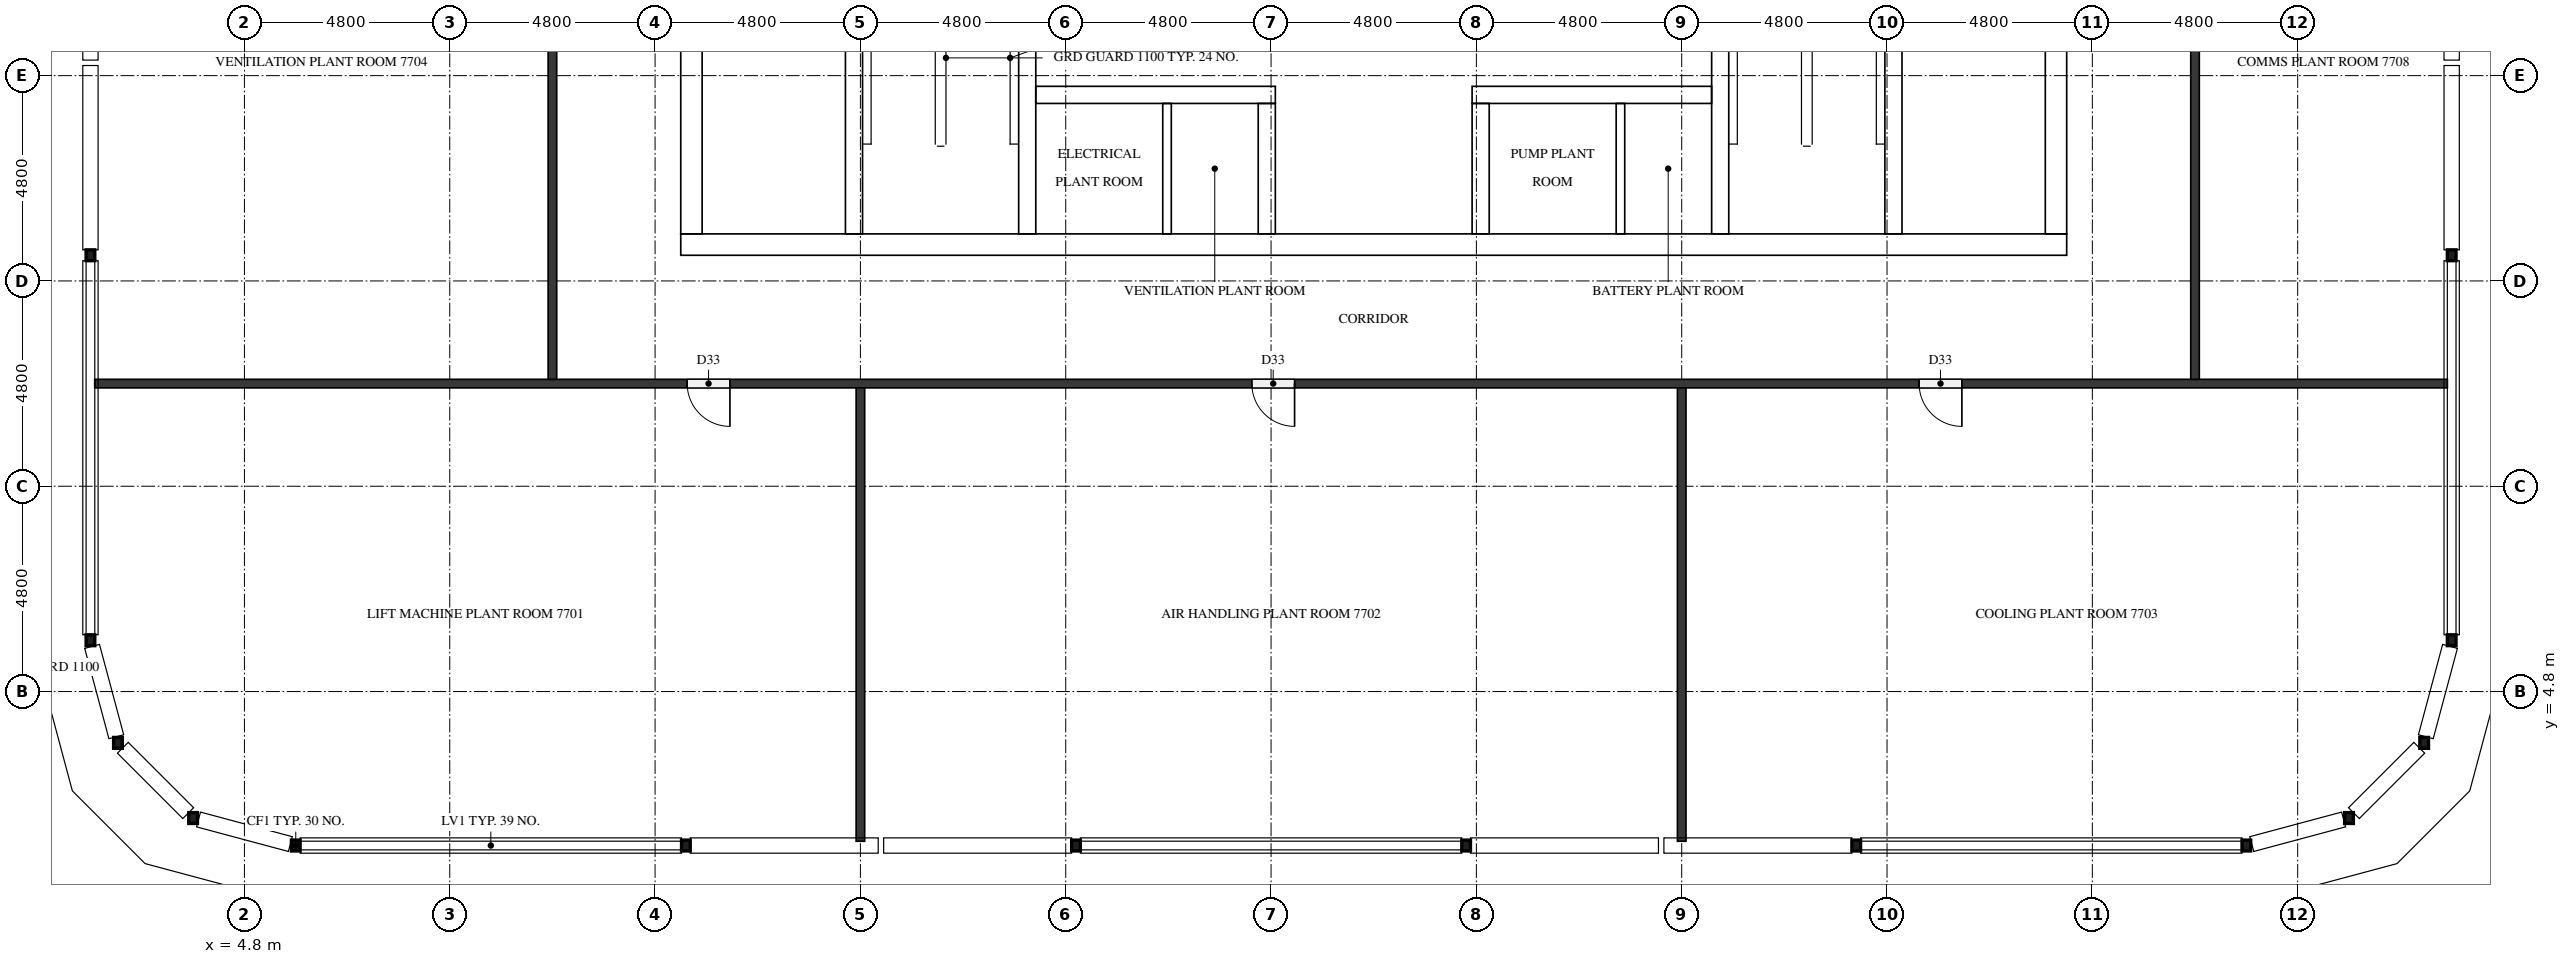
"""IFC4 building model, lengths in metres.
Left out: names, types, materials, properties, quantities, classifications, styles, units other than length and angle.
Written with IfcOpenShell. Run it as: python <this file> out.ifc"""

import sys

from ifc_helpers import new_model, si_unit, direction, frame, frame_2d, origin, origin_2d, place, context, subcontext, project, spatial, rectangle, hollow_rectangle, extrude, element, fill, save


model = new_model("IFC4")
c1 = context("Model", 3, precision=1e-05, world=origin(), true_north=direction((0.0, 1.0)))
c2 = subcontext(c1, "Body", "Model", "MODEL_VIEW")
j1 = project(units=[si_unit("LENGTHUNIT", "METRE"), si_unit("PLANEANGLEUNIT", "RADIAN")], contexts=[c1])
p1 = place(None, origin())
s1 = spatial("IfcSite", under=j1, at=p1, CompositionType="ELEMENT")
p2 = place(p1, origin())
s2 = spatial("IfcBuilding", under=s1, at=p2, CompositionType="ELEMENT")
p3 = place(p2, frame((0.0, 0.0, 296.3)))
s3 = spatial("IfcBuildingStorey", under=s2, at=p3, CompositionType="ELEMENT", Elevation=296.3)
p4 = place(p3, frame((15.0, 15.25, 0.0), z_axis=(0.0, 0.0, 1.0), x_axis=(1.0, 0.0, 0.0)))
e1 = element("IfcWall", 1, at=p4, inside=s3, PredefinedType="SHEAR", context=c2, shape_type="SweptSolid", body=[
    extrude(rectangle(XDim=32.4, YDim=0.5, at=frame_2d((16.2, 0.0))), origin(), (0.0, 0.0, 1.0), 4.4),
])
p5 = place(p4, frame((15.3, 0.0, 0.0)))
e2 = element("IfcOpeningElement", 2, at=p5, cuts=e1, PredefinedType="OPENING", context=c2, shape_type="SweptSolid", body=[
    extrude(rectangle(XDim=1.8, YDim=2.1, at=frame_2d((0.9, 1.05))), frame((0.0, 0.26, 0.0), z_axis=(0.0, -1.0, 0.0), x_axis=(1.0, 0.0, 0.0)), (0.0, 0.0, 1.0), 0.52),
])
p6 = place(p3, frame((15.25, 15.5, 0.0), z_axis=(0.0, 0.0, 1.0), x_axis=(0.0, 1.0, 0.0)))
e3 = element("IfcWall", 3, at=p6, inside=s3, PredefinedType="SHEAR", context=c2, shape_type="SweptSolid", body=[
    extrude(rectangle(XDim=21.8, YDim=0.5, at=frame_2d((10.9, 0.0))), origin(), (0.0, 0.0, 1.0), 4.4),
])
p7 = place(p6, frame((5.26, 0.0, 0.0)))
e4 = element("IfcOpeningElement", 4, at=p7, cuts=e3, PredefinedType="OPENING", context=c2, shape_type="SweptSolid", body=[
    extrude(rectangle(XDim=1.2, YDim=2.1, at=frame_2d((0.6, 1.05))), frame((0.0, 0.26, 0.0), z_axis=(0.0, -1.0, 0.0), x_axis=(1.0, 0.0, 0.0)), (0.0, 0.0, 1.0), 0.52),
])
p8 = place(p3, frame((47.15, 15.5, 0.0), z_axis=(0.0, 0.0, 1.0), x_axis=(0.0, 1.0, 0.0)))
e5 = element("IfcWall", 5, at=p8, inside=s3, PredefinedType="SHEAR", context=c2, shape_type="SweptSolid", body=[
    extrude(rectangle(XDim=21.8, YDim=0.5, at=frame_2d((10.9, 0.0))), origin(), (0.0, 0.0, 1.0), 4.4),
])
p9 = place(p8, frame((10.6, 0.0, 0.0)))
e6 = element("IfcOpeningElement", 6, at=p9, cuts=e5, PredefinedType="OPENING", context=c2, shape_type="SweptSolid", body=[
    extrude(rectangle(XDim=1.2, YDim=2.1, at=frame_2d((0.6, 1.05))), frame((0.0, 0.26, 0.0), z_axis=(0.0, -1.0, 0.0), x_axis=(1.0, 0.0, 0.0)), (0.0, 0.0, 1.0), 0.52),
])
p10 = place(p3, frame((19.05, 15.5, 0.0), z_axis=(0.0, 0.0, 1.0), x_axis=(0.0, 1.0, 0.0)))
e7 = element("IfcWall", 7, at=p10, inside=s3, PredefinedType="SHEAR", context=c2, shape_type="SweptSolid", body=[
    extrude(rectangle(XDim=15.55, YDim=0.4, at=frame_2d((7.775, 0.0))), origin(), (0.0, 0.0, 1.0), 4.4),
])
p11 = place(p10, frame((9.95, 0.0, 0.0)))
e8 = element("IfcOpeningElement", 8, at=p11, cuts=e7, PredefinedType="OPENING", context=c2, shape_type="SweptSolid", body=[
    extrude(rectangle(XDim=1.1, YDim=2.1, at=frame_2d((0.55, 1.05))), frame((0.0, 0.21, 0.0), z_axis=(0.0, -1.0, 0.0), x_axis=(1.0, 0.0, 0.0)), (0.0, 0.0, 1.0), 0.42),
])
p12 = place(p10, frame((13.45, 0.0, 0.0)))
e9 = element("IfcOpeningElement", 9, at=p12, cuts=e7, PredefinedType="OPENING", context=c2, shape_type="SweptSolid", body=[
    extrude(rectangle(XDim=1.1, YDim=2.1, at=frame_2d((0.55, 1.05))), frame((0.0, 0.21, 0.0), z_axis=(0.0, -1.0, 0.0), x_axis=(1.0, 0.0, 0.0)), (0.0, 0.0, 1.0), 0.42),
])
p13 = place(p10, frame((0.7, 0.0, 0.0)))
e10 = element("IfcOpeningElement", 10, at=p13, cuts=e7, PredefinedType="OPENING", context=c2, shape_type="SweptSolid", body=[
    extrude(rectangle(XDim=1.2, YDim=2.1, at=frame_2d((0.6, 1.05))), frame((0.0, 0.21, 0.0), z_axis=(0.0, -1.0, 0.0), x_axis=(1.0, 0.0, 0.0)), (0.0, 0.0, 1.0), 0.42),
])
p14 = place(p3, frame((23.1, 15.5, 0.0), z_axis=(0.0, 0.0, 1.0), x_axis=(0.0, 1.0, 0.0)))
e11 = element("IfcWall", 11, at=p14, inside=s3, PredefinedType="SHEAR", context=c2, shape_type="SweptSolid", body=[
    extrude(rectangle(XDim=21.8, YDim=0.4, at=frame_2d((10.9, 0.0))), origin(), (0.0, 0.0, 1.0), 4.4),
])
p15 = place(p3, frame((39.3, 15.5, 0.0), z_axis=(0.0, 0.0, 1.0), x_axis=(0.0, 1.0, 0.0)))
e12 = element("IfcWall", 12, at=p15, inside=s3, PredefinedType="SHEAR", context=c2, shape_type="SweptSolid", body=[
    extrude(rectangle(XDim=8.75, YDim=0.4, at=frame_2d((4.375, 0.0))), origin(), (0.0, 0.0, 1.0), 4.4),
])
p16 = place(p3, frame((43.35, 15.5, 0.0), z_axis=(0.0, 0.0, 1.0), x_axis=(0.0, 1.0, 0.0)))
e13 = element("IfcWall", 13, at=p16, inside=s3, PredefinedType="SHEAR", context=c2, shape_type="SweptSolid", body=[
    extrude(rectangle(XDim=8.75, YDim=0.4, at=frame_2d((4.375, 0.0))), origin(), (0.0, 0.0, 1.0), 4.4),
])
p17 = place(p16, frame((0.7, 0.0, 0.0)))
e14 = element("IfcOpeningElement", 14, at=p17, cuts=e13, PredefinedType="OPENING", context=c2, shape_type="SweptSolid", body=[
    extrude(rectangle(XDim=1.2, YDim=2.1, at=frame_2d((0.6, 1.05))), frame((0.0, 0.21, 0.0), z_axis=(0.0, -1.0, 0.0), x_axis=(1.0, 0.0, 0.0)), (0.0, 0.0, 1.0), 0.42),
])
p18 = place(p3, frame((23.3, 18.75, 0.0), z_axis=(0.0, 0.0, 1.0), x_axis=(1.0, 0.0, 0.0)))
e15 = element("IfcWall", 15, at=p18, inside=s3, PredefinedType="SHEAR", context=c2, shape_type="SweptSolid", body=[
    extrude(rectangle(XDim=5.6, YDim=0.4, at=frame_2d((2.8, 0.0))), origin(), (0.0, 0.0, 1.0), 4.4),
])
p19 = place(p18, frame((0.984, 0.0, 0.0)))
e16 = element("IfcOpeningElement", 16, at=p19, cuts=e15, PredefinedType="OPENING", context=c2, shape_type="SweptSolid", body=[
    extrude(rectangle(XDim=1.0, YDim=2.1, at=frame_2d((0.5, 1.05))), frame((0.0, 0.21, 0.0), z_axis=(0.0, -1.0, 0.0), x_axis=(1.0, 0.0, 0.0)), (0.0, 0.0, 1.0), 0.42),
])
p20 = place(p18, frame((3.684, 0.0, 0.0)))
e17 = element("IfcOpeningElement", 17, at=p20, cuts=e15, PredefinedType="OPENING", context=c2, shape_type="SweptSolid", body=[
    extrude(rectangle(XDim=1.0, YDim=2.1, at=frame_2d((0.5, 1.05))), frame((0.0, 0.21, 0.0), z_axis=(0.0, -1.0, 0.0), x_axis=(1.0, 0.0, 0.0)), (0.0, 0.0, 1.0), 0.42),
])
p21 = place(p3, frame((33.5, 18.75, 0.0), z_axis=(0.0, 0.0, 1.0), x_axis=(1.0, 0.0, 0.0)))
e18 = element("IfcWall", 18, at=p21, inside=s3, PredefinedType="SHEAR", context=c2, shape_type="SweptSolid", body=[
    extrude(rectangle(XDim=5.6, YDim=0.4, at=frame_2d((2.8, 0.0))), origin(), (0.0, 0.0, 1.0), 4.4),
])
p22 = place(p21, frame((1.384, 0.0, 0.0)))
e19 = element("IfcOpeningElement", 19, at=p22, cuts=e18, PredefinedType="OPENING", context=c2, shape_type="SweptSolid", body=[
    extrude(rectangle(XDim=1.0, YDim=2.1, at=frame_2d((0.5, 1.05))), frame((0.0, 0.21, 0.0), z_axis=(0.0, -1.0, 0.0), x_axis=(1.0, 0.0, 0.0)), (0.0, 0.0, 1.0), 0.42),
])
p23 = place(p21, frame((4.084, 0.0, 0.0)))
e20 = element("IfcOpeningElement", 20, at=p23, cuts=e18, PredefinedType="OPENING", context=c2, shape_type="SweptSolid", body=[
    extrude(rectangle(XDim=1.0, YDim=2.1, at=frame_2d((0.5, 1.05))), frame((0.0, 0.21, 0.0), z_axis=(0.0, -1.0, 0.0), x_axis=(1.0, 0.0, 0.0)), (0.0, 0.0, 1.0), 0.42),
])
for number, where, z_axis, x_axis in (
    (21, (28.7, 15.5, 0.0), (0.0, 0.0, 1.0), (0.0, 1.0, 0.0)),
    (22, (33.7, 15.5, 0.0), (0.0, 0.0, 1.0), (0.0, 1.0, 0.0)),
):
    element("IfcWall", number, at=place(p3, frame(where, z_axis=z_axis, x_axis=x_axis)), inside=s3, PredefinedType="SHEAR", context=c2, shape_type="SweptSolid", body=[
        extrude(rectangle(XDim=3.05, YDim=0.4, at=frame_2d((1.525, 0.0))), origin(), (0.0, 0.0, 1.0), 4.4),
    ])
for number, where, z_axis, x_axis in (
    (23, (6.0, 1.2, 0.0), (0.0, 0.0, 1.0), (1.0, 0.0, 0.0)),
    (24, (15.12, 1.2, 0.0), (0.0, 0.0, 1.0), (1.0, 0.0, 0.0)),
    (25, (24.24, 1.2, 0.0), (0.0, 0.0, 1.0), (1.0, 0.0, 0.0)),
    (26, (33.36, 1.2, 0.0), (0.0, 0.0, 1.0), (1.0, 0.0, 0.0)),
    (27, (42.48, 1.2, 0.0), (0.0, 0.0, 1.0), (1.0, 0.0, 0.0)),
    (28, (51.6, 1.2, 0.0), (0.0, 0.0, 1.0), (1.0, 0.0, 0.0)),
    (29, (54.0, 1.843, 0.0), (0.0, 0.0, 1.0), (1.0, 0.0, 0.0)),
    (30, (55.757, 3.6, 0.0), (0.0, 0.0, 1.0), (1.0, 0.0, 0.0)),
    (31, (56.4, 6.0, 0.0), (0.0, 0.0, 1.0), (1.0, 0.0, 0.0)),
    (32, (56.4, 15.0, 0.0), (0.0, 0.0, 1.0), (1.0, 0.0, 0.0)),
    (33, (1.2, 15.0, 0.0), (0.0, 0.0, 1.0), (1.0, 0.0, 0.0)),
    (34, (1.2, 6.0, 0.0), (0.0, 0.0, 1.0), (1.0, 0.0, 0.0)),
    (35, (1.843, 3.6, 0.0), (0.0, 0.0, 1.0), (1.0, 0.0, 0.0)),
    (36, (3.6, 1.843, 0.0), (0.0, 0.0, 1.0), (1.0, 0.0, 0.0)),
):
    element("IfcColumn", number, at=place(p3, frame(where, z_axis=z_axis, x_axis=x_axis)), inside=s3, PredefinedType="COLUMN", context=c2, shape_type="SweptSolid", body=[
        extrude(hollow_rectangle(XDim=0.203, YDim=0.254, WallThickness=0.01, InnerFilletRadius=0.004, OuterFilletRadius=0.013, at=origin_2d()), origin(), (0.0, 0.0, 1.0), 4.4),
    ])
for number, where, z_axis, x_axis in (
    (37, (26.368, 15.5, 0.0), (0.0, 0.0, 1.0), (0.0, 1.0, 0.0)),
    (38, (36.968, 15.5, 0.0), (0.0, 0.0, 1.0), (0.0, 1.0, 0.0)),
):
    element("IfcWall", number, at=place(p3, frame(where, z_axis=z_axis, x_axis=x_axis)), inside=s3, PredefinedType="PARTITIONING", context=c2, shape_type="SweptSolid", body=[
        extrude(rectangle(XDim=3.05, YDim=0.2, at=frame_2d((1.525, 0.0))), origin(), (0.0, 0.0, 1.0), 4.4),
    ])
p24 = place(p3, frame((56.3, 12.0, 0.0), z_axis=(0.0, 0.0, 1.0), x_axis=(-1.0, 0.0, 0.0)))
e39 = element("IfcWall", 39, at=p24, inside=s3, PredefinedType="PARTITIONING", context=c2, shape_type="SweptSolid", body=[
    extrude(rectangle(XDim=55.0, YDim=0.2, at=frame_2d((27.5, 0.0))), origin(), (0.0, 0.0, 1.0), 4.4),
])
p25 = place(p24, frame((40.15, 0.0, 0.0)))
e40 = element("IfcOpeningElement", 40, at=p25, cuts=e39, PredefinedType="OPENING", context=c2, shape_type="SweptSolid", body=[
    extrude(rectangle(XDim=1.0, YDim=2.1, at=frame_2d((0.5, 1.05))), frame((0.0, 0.11, 0.0), z_axis=(0.0, -1.0, 0.0), x_axis=(1.0, 0.0, 0.0)), (0.0, 0.0, 1.0), 0.22),
])
p26 = place(p24, frame((26.95, 0.0, 0.0)))
e41 = element("IfcOpeningElement", 41, at=p26, cuts=e39, PredefinedType="OPENING", context=c2, shape_type="SweptSolid", body=[
    extrude(rectangle(XDim=1.0, YDim=2.1, at=frame_2d((0.5, 1.05))), frame((0.0, 0.11, 0.0), z_axis=(0.0, -1.0, 0.0), x_axis=(1.0, 0.0, 0.0)), (0.0, 0.0, 1.0), 0.22),
])
p27 = place(p24, frame((11.35, 0.0, 0.0)))
e42 = element("IfcOpeningElement", 42, at=p27, cuts=e39, PredefinedType="OPENING", context=c2, shape_type="SweptSolid", body=[
    extrude(rectangle(XDim=1.0, YDim=2.1, at=frame_2d((0.5, 1.05))), frame((0.0, 0.11, 0.0), z_axis=(0.0, -1.0, 0.0), x_axis=(1.0, 0.0, 0.0)), (0.0, 0.0, 1.0), 0.22),
])
p28 = place(p3, frame((12.0, 12.1, 0.0), z_axis=(0.0, 0.0, 1.0), x_axis=(0.0, 1.0, 0.0)))
e43 = element("IfcWall", 43, at=p28, inside=s3, PredefinedType="PARTITIONING", context=c2, shape_type="SweptSolid", body=[
    extrude(rectangle(XDim=28.6, YDim=0.2, at=frame_2d((14.3, 0.0))), origin(), (0.0, 0.0, 1.0), 4.4),
])
p29 = place(p28, frame((7.85, 0.0, 0.0)))
e44 = element("IfcOpeningElement", 44, at=p29, cuts=e43, PredefinedType="OPENING", context=c2, shape_type="SweptSolid", body=[
    extrude(rectangle(XDim=1.0, YDim=2.1, at=frame_2d((0.5, 1.05))), frame((0.0, 0.11, 0.0), z_axis=(0.0, -1.0, 0.0), x_axis=(1.0, 0.0, 0.0)), (0.0, 0.0, 1.0), 0.22),
])
p30 = place(p28, frame((22.15, 0.0, 0.0)))
e45 = element("IfcOpeningElement", 45, at=p30, cuts=e43, PredefinedType="OPENING", context=c2, shape_type="SweptSolid", body=[
    extrude(rectangle(XDim=1.0, YDim=2.1, at=frame_2d((0.5, 1.05))), frame((0.0, 0.11, 0.0), z_axis=(0.0, -1.0, 0.0), x_axis=(1.0, 0.0, 0.0)), (0.0, 0.0, 1.0), 0.22),
])
for number, where, z_axis, x_axis in (
    (46, (19.2, 1.3, 0.0), (0.0, 0.0, 1.0), (0.0, 1.0, 0.0)),
    (47, (38.4, 1.3, 0.0), (0.0, 0.0, 1.0), (0.0, 1.0, 0.0)),
):
    element("IfcWall", number, at=place(p3, frame(where, z_axis=z_axis, x_axis=x_axis)), inside=s3, PredefinedType="PARTITIONING", context=c2, shape_type="SweptSolid", body=[
        extrude(rectangle(XDim=10.6, YDim=0.2, at=frame_2d((5.3, 0.0))), origin(), (0.0, 0.0, 1.0), 4.4),
    ])
p31 = place(p3, frame((50.4, 40.7, 0.0), z_axis=(0.0, 0.0, 1.0), x_axis=(0.0, -1.0, 0.0)))
e48 = element("IfcWall", 48, at=p31, inside=s3, PredefinedType="PARTITIONING", context=c2, shape_type="SweptSolid", body=[
    extrude(rectangle(XDim=28.6, YDim=0.2, at=frame_2d((14.3, 0.0))), origin(), (0.0, 0.0, 1.0), 4.4),
])
p32 = place(p31, frame((19.75, 0.0, 0.0)))
e49 = element("IfcOpeningElement", 49, at=p32, cuts=e48, PredefinedType="OPENING", context=c2, shape_type="SweptSolid", body=[
    extrude(rectangle(XDim=1.0, YDim=2.1, at=frame_2d((0.5, 1.05))), frame((0.0, 0.11, 0.0), z_axis=(0.0, -1.0, 0.0), x_axis=(1.0, 0.0, 0.0)), (0.0, 0.0, 1.0), 0.22),
])
p33 = place(p31, frame((5.45, 0.0, 0.0)))
e50 = element("IfcOpeningElement", 50, at=p33, cuts=e48, PredefinedType="OPENING", context=c2, shape_type="SweptSolid", body=[
    extrude(rectangle(XDim=1.0, YDim=2.1, at=frame_2d((0.5, 1.05))), frame((0.0, 0.11, 0.0), z_axis=(0.0, -1.0, 0.0), x_axis=(1.0, 0.0, 0.0)), (0.0, 0.0, 1.0), 0.22),
])
p34 = place(p13, frame((1.2, 0.0, 0.0), z_axis=(0.0, 0.0, 1.0), x_axis=(-1.0, 0.0, 0.0)))
e51 = element("IfcDoor", 51, at=p34, inside=s3, OperationType="SINGLE_SWING_LEFT", PredefinedType="DOOR", context=c2, shape_type="SweptSolid", body=[
    extrude(rectangle(XDim=1.2, YDim=2.1, at=frame_2d((0.6, 1.05))), frame((0.0, 0.025, 0.0), z_axis=(0.0, -1.0, 0.0), x_axis=(1.0, 0.0, 0.0)), (0.0, 0.0, 1.0), 0.05),
])
fill(e10, e51)
p35 = place(p17, origin())
e52 = element("IfcDoor", 52, at=p35, inside=s3, OperationType="SINGLE_SWING_RIGHT", PredefinedType="DOOR", context=c2, shape_type="SweptSolid", body=[
    extrude(rectangle(XDim=1.2, YDim=2.1, at=frame_2d((0.6, 1.05))), frame((0.0, 0.025, 0.0), z_axis=(0.0, -1.0, 0.0), x_axis=(1.0, 0.0, 0.0)), (0.0, 0.0, 1.0), 0.05),
])
fill(e14, e52)
p36 = place(p5, frame((1.8, 0.0, 0.0), z_axis=(0.0, 0.0, 1.0), x_axis=(-1.0, 0.0, 0.0)))
e53 = element("IfcDoor", 53, at=p36, inside=s3, OperationType="DOUBLE_DOOR_SINGLE_SWING", PredefinedType="DOOR", context=c2, shape_type="SweptSolid", body=[
    extrude(rectangle(XDim=1.8, YDim=2.1, at=frame_2d((0.9, 1.05))), frame((0.0, 0.025, 0.0), z_axis=(0.0, -1.0, 0.0), x_axis=(1.0, 0.0, 0.0)), (0.0, 0.0, 1.0), 0.05),
])
fill(e2, e53)
p37 = place(p19, origin())
e54 = element("IfcDoor", 54, at=p37, inside=s3, OperationType="SINGLE_SWING_LEFT", PredefinedType="DOOR", context=c2, shape_type="SweptSolid", body=[
    extrude(rectangle(XDim=1.0, YDim=2.1, at=frame_2d((0.5, 1.05))), frame((0.0, 0.025, 0.0), z_axis=(0.0, -1.0, 0.0), x_axis=(1.0, 0.0, 0.0)), (0.0, 0.0, 1.0), 0.05),
])
fill(e16, e54)
p38 = place(p20, origin())
e55 = element("IfcDoor", 55, at=p38, inside=s3, OperationType="SINGLE_SWING_RIGHT", PredefinedType="DOOR", context=c2, shape_type="SweptSolid", body=[
    extrude(rectangle(XDim=1.0, YDim=2.1, at=frame_2d((0.5, 1.05))), frame((0.0, 0.025, 0.0), z_axis=(0.0, -1.0, 0.0), x_axis=(1.0, 0.0, 0.0)), (0.0, 0.0, 1.0), 0.05),
])
fill(e17, e55)
p39 = place(p22, origin())
e56 = element("IfcDoor", 56, at=p39, inside=s3, OperationType="SINGLE_SWING_LEFT", PredefinedType="DOOR", context=c2, shape_type="SweptSolid", body=[
    extrude(rectangle(XDim=1.0, YDim=2.1, at=frame_2d((0.5, 1.05))), frame((0.0, 0.025, 0.0), z_axis=(0.0, -1.0, 0.0), x_axis=(1.0, 0.0, 0.0)), (0.0, 0.0, 1.0), 0.05),
])
fill(e19, e56)
p40 = place(p23, origin())
e57 = element("IfcDoor", 57, at=p40, inside=s3, OperationType="SINGLE_SWING_RIGHT", PredefinedType="DOOR", context=c2, shape_type="SweptSolid", body=[
    extrude(rectangle(XDim=1.0, YDim=2.1, at=frame_2d((0.5, 1.05))), frame((0.0, 0.025, 0.0), z_axis=(0.0, -1.0, 0.0), x_axis=(1.0, 0.0, 0.0)), (0.0, 0.0, 1.0), 0.05),
])
fill(e20, e57)
p41 = place(p25, origin())
e58 = element("IfcDoor", 58, at=p41, inside=s3, OperationType="SINGLE_SWING_LEFT", PredefinedType="DOOR", context=c2, shape_type="SweptSolid", body=[
    extrude(rectangle(XDim=1.0, YDim=2.1, at=frame_2d((0.5, 1.05))), frame((0.0, 0.025, 0.0), z_axis=(0.0, -1.0, 0.0), x_axis=(1.0, 0.0, 0.0)), (0.0, 0.0, 1.0), 0.05),
])
fill(e40, e58)
p42 = place(p26, origin())
e59 = element("IfcDoor", 59, at=p42, inside=s3, OperationType="SINGLE_SWING_LEFT", PredefinedType="DOOR", context=c2, shape_type="SweptSolid", body=[
    extrude(rectangle(XDim=1.0, YDim=2.1, at=frame_2d((0.5, 1.05))), frame((0.0, 0.025, 0.0), z_axis=(0.0, -1.0, 0.0), x_axis=(1.0, 0.0, 0.0)), (0.0, 0.0, 1.0), 0.05),
])
fill(e41, e59)
p43 = place(p27, origin())
e60 = element("IfcDoor", 60, at=p43, inside=s3, OperationType="SINGLE_SWING_LEFT", PredefinedType="DOOR", context=c2, shape_type="SweptSolid", body=[
    extrude(rectangle(XDim=1.0, YDim=2.1, at=frame_2d((0.5, 1.05))), frame((0.0, 0.025, 0.0), z_axis=(0.0, -1.0, 0.0), x_axis=(1.0, 0.0, 0.0)), (0.0, 0.0, 1.0), 0.05),
])
fill(e42, e60)
save(model, sys.argv[1])
